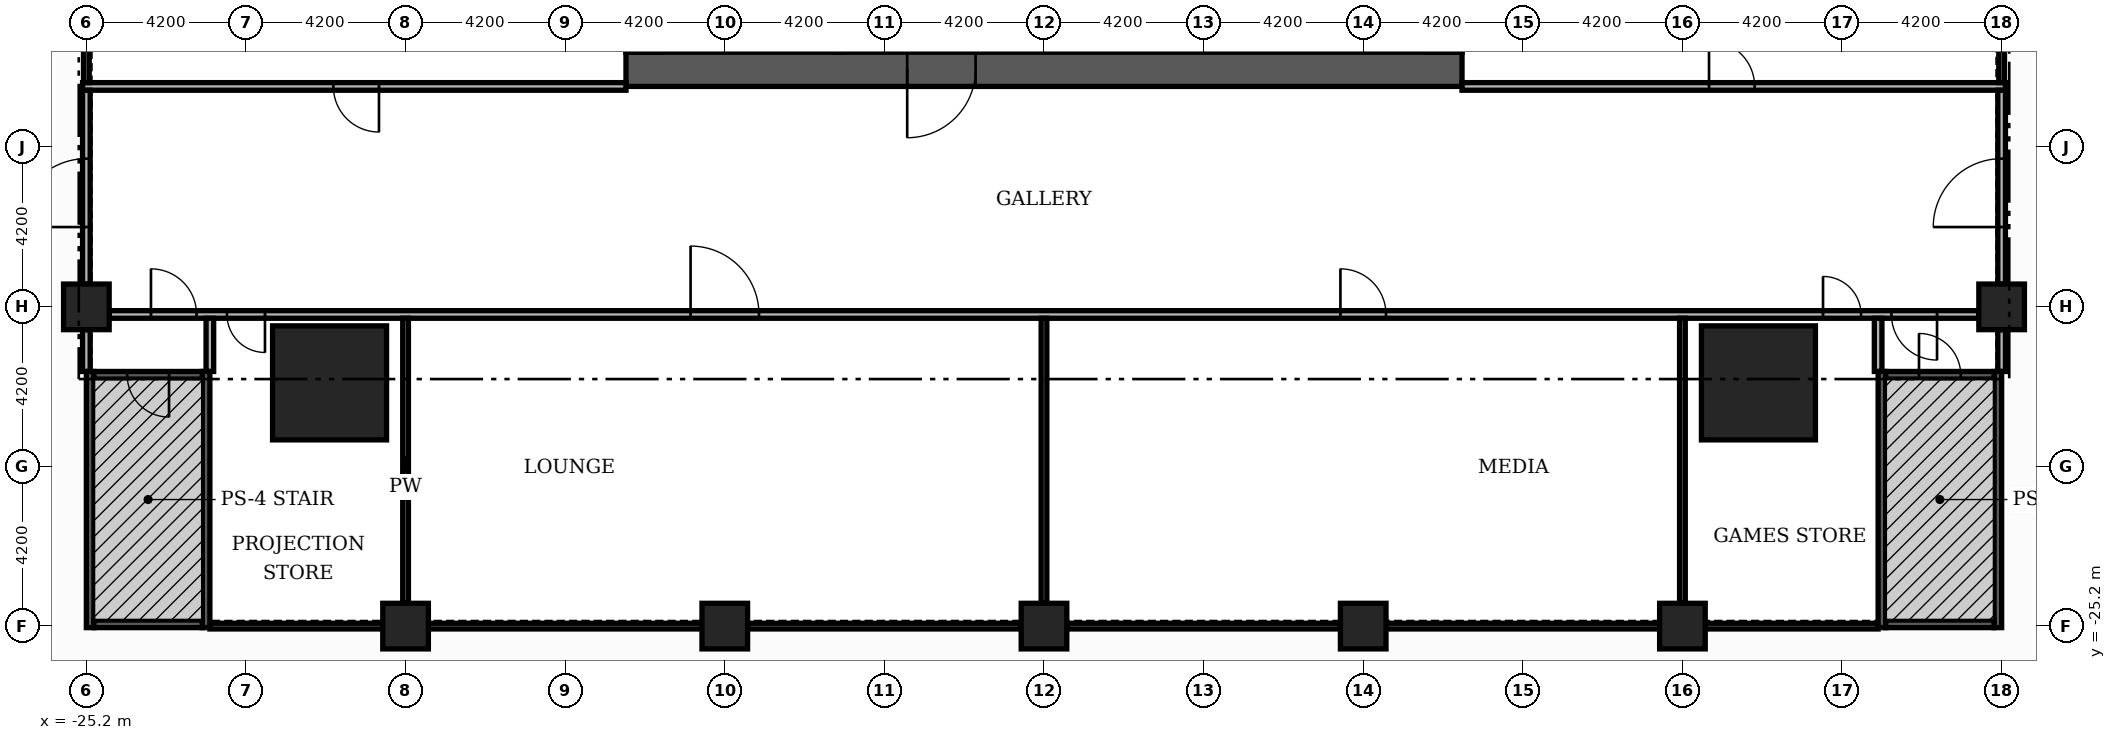
"""IFC4 building model, lengths in metres.
Left out: names, types, materials, properties, quantities, classifications, styles, units other than length and angle.
Written with IfcOpenShell. Run it as: python <this file> out.ifc"""

import sys

from ifc_helpers import new_model, si_unit, direction, frame, frame_2d, origin, origin_2d, place, context, subcontext, project, spatial, rectangle, extrude, element, fill, save


model = new_model("IFC4")
c1 = context("Model", 3, precision=1e-05, world=origin(), true_north=direction((0.0, 1.0)))
c2 = subcontext(c1, "Body", "Model", "MODEL_VIEW")
j1 = project(units=[si_unit("LENGTHUNIT", "METRE"), si_unit("PLANEANGLEUNIT", "RADIAN")], contexts=[c1])
p1 = place(None, origin())
s1 = spatial("IfcSite", under=j1, at=p1, CompositionType="ELEMENT")
p2 = place(p1, origin())
s2 = spatial("IfcBuilding", under=s1, at=p2, CompositionType="ELEMENT")
p3 = place(p2, frame((0.0, 0.0, 22.2)))
s3 = spatial("IfcBuildingStorey", under=s2, at=p3, CompositionType="ELEMENT", Elevation=22.2)
p4 = place(p3, frame((-11.0, -10.55, 0.0), z_axis=(0.0, 0.0, 1.0), x_axis=(1.0, 0.0, 0.0)))
e1 = element("IfcWall", 1, at=p4, inside=s3, PredefinedType="SHEAR", context=c2, shape_type="SweptSolid", body=[
    extrude(rectangle(XDim=22.0, YDim=0.9, at=frame_2d((11.0, 0.0))), origin(), (0.0, 0.0, 1.0), 4.3),
])
p5 = place(p4, frame((7.4, 0.0, 0.0)))
e2 = element("IfcOpeningElement", 2, at=p5, cuts=e1, PredefinedType="OPENING", context=c2, shape_type="SweptSolid", body=[
    extrude(rectangle(XDim=1.8, YDim=2.2, at=frame_2d((0.9, 1.1))), frame((0.0, 0.46, 0.0), z_axis=(0.0, -1.0, 0.0), x_axis=(1.0, 0.0, 0.0)), (0.0, 0.0, 1.0), 0.92),
])
for number, where, z_axis, x_axis in (
    (3, (18.8, -18.8, 0.0), (0.0, 0.0, 1.0), (1.0, 0.0, 0.0)),
    (4, (-18.8, -18.8, 0.0), (0.0, 0.0, 1.0), (1.0, 0.0, 0.0)),
):
    element("IfcColumn", number, at=place(p3, frame(where, z_axis=z_axis, x_axis=x_axis)), inside=s3, PredefinedType="COLUMN", context=c2, shape_type="SweptSolid", body=[
        extrude(rectangle(XDim=3.0, YDim=3.0, at=origin_2d()), origin(), (0.0, 0.0, 1.0), 4.8),
    ])
for number, where, z_axis, x_axis in (
    (5, (25.2, -16.8, 0.0), (0.0, 0.0, 1.0), (1.0, 0.0, 0.0)),
    (6, (0.0, -25.2, 0.0), (0.0, 0.0, 1.0), (1.0, 0.0, 0.0)),
    (7, (8.4, -25.2, 0.0), (0.0, 0.0, 1.0), (1.0, 0.0, 0.0)),
    (8, (16.8, -25.2, 0.0), (0.0, 0.0, 1.0), (1.0, 0.0, 0.0)),
    (9, (-8.4, -25.2, 0.0), (0.0, 0.0, 1.0), (1.0, 0.0, 0.0)),
    (10, (-16.8, -25.2, 0.0), (0.0, 0.0, 1.0), (1.0, 0.0, 0.0)),
    (11, (-25.2, -16.8, 0.0), (0.0, 0.0, 1.0), (1.0, 0.0, 0.0)),
):
    element("IfcColumn", number, at=place(p3, frame(where, z_axis=z_axis, x_axis=x_axis)), inside=s3, PredefinedType="COLUMN", context=c2, shape_type="SweptSolid", body=[
        extrude(rectangle(XDim=1.2, YDim=1.2, at=origin_2d()), origin(), (0.0, 0.0, 1.0), 4.8),
    ])
p6 = place(p3, frame((-21.95, -25.2, 0.0), z_axis=(0.0, 0.0, 1.0), x_axis=(1.0, 0.0, 0.0)))
e12 = element("IfcWall", 12, at=p6, inside=s3, PredefinedType="PARTITIONING", context=c2, shape_type="SweptSolid", body=[
    extrude(rectangle(XDim=4.55, YDim=0.15, at=frame_2d((2.275, 0.0))), origin(), (0.0, 0.0, 1.0), 4.3),
])
for number, where, z_axis, x_axis in (
    (13, (-16.2, -25.2, 0.0), (0.0, 0.0, 1.0), (1.0, 0.0, 0.0)),
    (14, (-7.8, -25.2, 0.0), (0.0, 0.0, 1.0), (1.0, 0.0, 0.0)),
    (15, (0.6, -25.2, 0.0), (0.0, 0.0, 1.0), (1.0, 0.0, 0.0)),
    (16, (9.0, -25.2, 0.0), (0.0, 0.0, 1.0), (1.0, 0.0, 0.0)),
):
    element("IfcWall", number, at=place(p3, frame(where, z_axis=z_axis, x_axis=x_axis)), inside=s3, PredefinedType="PARTITIONING", context=c2, shape_type="SweptSolid", body=[
        extrude(rectangle(XDim=7.2, YDim=0.15, at=frame_2d((3.6, 0.0))), origin(), (0.0, 0.0, 1.0), 4.3),
    ])
p7 = place(p3, frame((17.4, -25.2, 0.0), z_axis=(0.0, 0.0, 1.0), x_axis=(1.0, 0.0, 0.0)))
e17 = element("IfcWall", 17, at=p7, inside=s3, PredefinedType="PARTITIONING", context=c2, shape_type="SweptSolid", body=[
    extrude(rectangle(XDim=4.55, YDim=0.15, at=frame_2d((2.275, 0.0))), origin(), (0.0, 0.0, 1.0), 4.3),
])
p8 = place(p3, frame((-24.6, -17.0, 0.0), z_axis=(0.0, 0.0, 1.0), x_axis=(1.0, 0.0, 0.0)))
e18 = element("IfcWall", 18, at=p8, inside=s3, PredefinedType="PARTITIONING", context=c2, shape_type="SweptSolid", body=[
    extrude(rectangle(XDim=49.2, YDim=0.2, at=frame_2d((24.6, 0.0))), origin(), (0.0, 0.0, 1.0), 4.3),
])
p9 = place(p8, frame((1.1, 0.0, 0.0)))
e19 = element("IfcOpeningElement", 19, at=p9, cuts=e18, PredefinedType="OPENING", context=c2, shape_type="SweptSolid", body=[
    extrude(rectangle(XDim=1.2, YDim=2.2, at=frame_2d((0.6, 1.1))), frame((0.0, 0.11, 0.0), z_axis=(0.0, -1.0, 0.0), x_axis=(1.0, 0.0, 0.0)), (0.0, 0.0, 1.0), 0.22),
])
p10 = place(p8, frame((3.1, 0.0, 0.0)))
e20 = element("IfcOpeningElement", 20, at=p10, cuts=e18, PredefinedType="OPENING", context=c2, shape_type="SweptSolid", body=[
    extrude(rectangle(XDim=1.0, YDim=2.1, at=frame_2d((0.5, 1.05))), frame((0.0, 0.11, 0.0), z_axis=(0.0, -1.0, 0.0), x_axis=(1.0, 0.0, 0.0)), (0.0, 0.0, 1.0), 0.22),
])
p11 = place(p8, frame((15.3, 0.0, 0.0)))
e21 = element("IfcOpeningElement", 21, at=p11, cuts=e18, PredefinedType="OPENING", context=c2, shape_type="SweptSolid", body=[
    extrude(rectangle(XDim=1.8, YDim=2.2, at=frame_2d((0.9, 1.1))), frame((0.0, 0.11, 0.0), z_axis=(0.0, -1.0, 0.0), x_axis=(1.0, 0.0, 0.0)), (0.0, 0.0, 1.0), 0.22),
])
p12 = place(p8, frame((32.4, 0.0, 0.0)))
e22 = element("IfcOpeningElement", 22, at=p12, cuts=e18, PredefinedType="OPENING", context=c2, shape_type="SweptSolid", body=[
    extrude(rectangle(XDim=1.2, YDim=2.2, at=frame_2d((0.6, 1.1))), frame((0.0, 0.11, 0.0), z_axis=(0.0, -1.0, 0.0), x_axis=(1.0, 0.0, 0.0)), (0.0, 0.0, 1.0), 0.22),
])
p13 = place(p8, frame((45.1, 0.0, 0.0)))
e23 = element("IfcOpeningElement", 23, at=p13, cuts=e18, PredefinedType="OPENING", context=c2, shape_type="SweptSolid", body=[
    extrude(rectangle(XDim=1.0, YDim=2.1, at=frame_2d((0.5, 1.05))), frame((0.0, 0.11, 0.0), z_axis=(0.0, -1.0, 0.0), x_axis=(1.0, 0.0, 0.0)), (0.0, 0.0, 1.0), 0.22),
])
p14 = place(p8, frame((46.9, 0.0, 0.0)))
e24 = element("IfcOpeningElement", 24, at=p14, cuts=e18, PredefinedType="OPENING", context=c2, shape_type="SweptSolid", body=[
    extrude(rectangle(XDim=1.2, YDim=2.2, at=frame_2d((0.6, 1.1))), frame((0.0, 0.11, 0.0), z_axis=(0.0, -1.0, 0.0), x_axis=(1.0, 0.0, 0.0)), (0.0, 0.0, 1.0), 0.22),
])
p15 = place(p3, frame((-25.3, -11.0, 0.0), z_axis=(0.0, 0.0, 1.0), x_axis=(1.0, 0.0, 0.0)))
e25 = element("IfcWall", 25, at=p15, inside=s3, PredefinedType="PARTITIONING", context=c2, shape_type="SweptSolid", body=[
    extrude(rectangle(XDim=14.3, YDim=0.2, at=frame_2d((7.15, 0.0))), origin(), (0.0, 0.0, 1.0), 4.3),
])
p16 = place(p15, frame((6.6, 0.0, 0.0)))
e26 = element("IfcOpeningElement", 26, at=p16, cuts=e25, PredefinedType="OPENING", context=c2, shape_type="SweptSolid", body=[
    extrude(rectangle(XDim=1.2, YDim=2.2, at=frame_2d((0.6, 1.1))), frame((0.0, 0.11, 0.0), z_axis=(0.0, -1.0, 0.0), x_axis=(1.0, 0.0, 0.0)), (0.0, 0.0, 1.0), 0.22),
])
p17 = place(p3, frame((11.0, -11.0, 0.0), z_axis=(0.0, 0.0, 1.0), x_axis=(1.0, 0.0, 0.0)))
e27 = element("IfcWall", 27, at=p17, inside=s3, PredefinedType="PARTITIONING", context=c2, shape_type="SweptSolid", body=[
    extrude(rectangle(XDim=14.3, YDim=0.2, at=frame_2d((7.15, 0.0))), origin(), (0.0, 0.0, 1.0), 4.3),
])
p18 = place(p17, frame((6.5, 0.0, 0.0)))
e28 = element("IfcOpeningElement", 28, at=p18, cuts=e27, PredefinedType="OPENING", context=c2, shape_type="SweptSolid", body=[
    extrude(rectangle(XDim=1.2, YDim=2.2, at=frame_2d((0.6, 1.1))), frame((0.0, 0.11, 0.0), z_axis=(0.0, -1.0, 0.0), x_axis=(1.0, 0.0, 0.0)), (0.0, 0.0, 1.0), 0.22),
])
p19 = place(p3, frame((-25.2, -18.5, 0.0), z_axis=(0.0, 0.0, 1.0), x_axis=(0.0, 1.0, 0.0)))
e29 = element("IfcWall", 29, at=p19, inside=s3, PredefinedType="PARTITIONING", context=c2, shape_type="SweptSolid", body=[
    extrude(rectangle(XDim=1.1, YDim=0.2, at=frame_2d((0.55, 0.0))), origin(), (0.0, 0.0, 1.0), 4.3),
])
p20 = place(p3, frame((-25.2, -16.2, 0.0), z_axis=(0.0, 0.0, 1.0), x_axis=(0.0, 1.0, 0.0)))
e30 = element("IfcWall", 30, at=p20, inside=s3, PredefinedType="PARTITIONING", context=c2, shape_type="SweptSolid", body=[
    extrude(rectangle(XDim=5.1, YDim=0.2, at=frame_2d((2.55, 0.0))), origin(), (0.0, 0.0, 1.0), 4.3),
])
p21 = place(p20, frame((1.5, 0.0, 0.0)))
e31 = element("IfcOpeningElement", 31, at=p21, cuts=e30, PredefinedType="OPENING", context=c2, shape_type="SweptSolid", body=[
    extrude(rectangle(XDim=1.8, YDim=2.2, at=frame_2d((0.9, 1.1))), frame((0.0, 0.11, 0.0), z_axis=(0.0, -1.0, 0.0), x_axis=(1.0, 0.0, 0.0)), (0.0, 0.0, 1.0), 0.22),
])
p22 = place(p3, frame((-25.2, -10.9, 0.0), z_axis=(0.0, 0.0, 1.0), x_axis=(0.0, 1.0, 0.0)))
e32 = element("IfcWall", 32, at=p22, inside=s3, PredefinedType="PARTITIONING", context=c2, shape_type="SweptSolid", body=[
    extrude(rectangle(XDim=1.9, YDim=0.15, at=frame_2d((0.95, 0.0))), origin(), (0.0, 0.0, 1.0), 4.3),
])
p23 = place(p3, frame((-21.95, -18.5, 0.0), z_axis=(0.0, 0.0, 1.0), x_axis=(0.0, 1.0, 0.0)))
e33 = element("IfcWall", 33, at=p23, inside=s3, PredefinedType="PARTITIONING", context=c2, shape_type="SweptSolid", body=[
    extrude(rectangle(XDim=1.4, YDim=0.2, at=frame_2d((0.7, 0.0))), origin(), (0.0, 0.0, 1.0), 4.3),
])
for number, where, z_axis, x_axis in (
    (34, (-16.8, -24.6, 0.0), (0.0, 0.0, 1.0), (0.0, 1.0, 0.0)),
    (35, (0.0, -24.6, 0.0), (0.0, 0.0, 1.0), (0.0, 1.0, 0.0)),
    (36, (16.8, -24.6, 0.0), (0.0, 0.0, 1.0), (0.0, 1.0, 0.0)),
):
    element("IfcWall", number, at=place(p3, frame(where, z_axis=z_axis, x_axis=x_axis)), inside=s3, PredefinedType="PARTITIONING", context=c2, shape_type="SweptSolid", body=[
        extrude(rectangle(XDim=7.5, YDim=0.15, at=frame_2d((3.75, 0.0))), origin(), (0.0, 0.0, 1.0), 4.3),
    ])
p24 = place(p3, frame((21.95, -18.5, 0.0), z_axis=(0.0, 0.0, 1.0), x_axis=(0.0, 1.0, 0.0)))
e37 = element("IfcWall", 37, at=p24, inside=s3, PredefinedType="PARTITIONING", context=c2, shape_type="SweptSolid", body=[
    extrude(rectangle(XDim=1.4, YDim=0.2, at=frame_2d((0.7, 0.0))), origin(), (0.0, 0.0, 1.0), 4.3),
])
p25 = place(p3, frame((25.2, -18.5, 0.0), z_axis=(0.0, 0.0, 1.0), x_axis=(0.0, 1.0, 0.0)))
e38 = element("IfcWall", 38, at=p25, inside=s3, PredefinedType="PARTITIONING", context=c2, shape_type="SweptSolid", body=[
    extrude(rectangle(XDim=1.1, YDim=0.2, at=frame_2d((0.55, 0.0))), origin(), (0.0, 0.0, 1.0), 4.3),
])
p26 = place(p3, frame((25.2, -16.2, 0.0), z_axis=(0.0, 0.0, 1.0), x_axis=(0.0, 1.0, 0.0)))
e39 = element("IfcWall", 39, at=p26, inside=s3, PredefinedType="PARTITIONING", context=c2, shape_type="SweptSolid", body=[
    extrude(rectangle(XDim=5.1, YDim=0.2, at=frame_2d((2.55, 0.0))), origin(), (0.0, 0.0, 1.0), 4.3),
])
p27 = place(p26, frame((1.5, 0.0, 0.0)))
e40 = element("IfcOpeningElement", 40, at=p27, cuts=e39, PredefinedType="OPENING", context=c2, shape_type="SweptSolid", body=[
    extrude(rectangle(XDim=1.8, YDim=2.2, at=frame_2d((0.9, 1.1))), frame((0.0, 0.11, 0.0), z_axis=(0.0, -1.0, 0.0), x_axis=(1.0, 0.0, 0.0)), (0.0, 0.0, 1.0), 0.22),
])
p28 = place(p3, frame((25.2, -10.9, 0.0), z_axis=(0.0, 0.0, 1.0), x_axis=(0.0, 1.0, 0.0)))
e41 = element("IfcWall", 41, at=p28, inside=s3, PredefinedType="PARTITIONING", context=c2, shape_type="SweptSolid", body=[
    extrude(rectangle(XDim=1.9, YDim=0.15, at=frame_2d((0.95, 0.0))), origin(), (0.0, 0.0, 1.0), 4.3),
])
for number, where, z_axis, x_axis in (
    (42, (22.05, -25.24, 0.0), (0.0, 0.0, 1.0), (0.0, 1.0, 0.0)),
    (43, (25.1, -25.24, 0.0), (0.0, 0.0, 1.0), (0.0, 1.0, 0.0)),
):
    element("IfcWall", number, at=place(p3, frame(where, z_axis=z_axis, x_axis=x_axis)), inside=s3, PredefinedType="SOLIDWALL", context=c2, shape_type="SweptSolid", body=[
        extrude(rectangle(XDim=6.74, YDim=0.2, at=frame_2d((3.37, 0.0))), origin(), (0.0, 0.0, 1.0), 4.3),
    ])
p29 = place(p3, frame((22.15, -25.14, 0.0), z_axis=(0.0, 0.0, 1.0), x_axis=(1.0, 0.0, 0.0)))
e44 = element("IfcWall", 44, at=p29, inside=s3, PredefinedType="SOLIDWALL", context=c2, shape_type="SweptSolid", body=[
    extrude(rectangle(XDim=2.85, YDim=0.2, at=frame_2d((1.425, 0.0))), origin(), (0.0, 0.0, 1.0), 4.3),
])
p30 = place(p3, frame((22.15, -18.6, 0.0), z_axis=(0.0, 0.0, 1.0), x_axis=(1.0, 0.0, 0.0)))
e45 = element("IfcWall", 45, at=p30, inside=s3, PredefinedType="SOLIDWALL", context=c2, shape_type="SweptSolid", body=[
    extrude(rectangle(XDim=2.85, YDim=0.2, at=frame_2d((1.425, 0.0))), origin(), (0.0, 0.0, 1.0), 4.3),
])
p31 = place(p30, frame((0.875, 0.0, 0.0)))
e46 = element("IfcOpeningElement", 46, at=p31, cuts=e45, PredefinedType="OPENING", context=c2, shape_type="SweptSolid", body=[
    extrude(rectangle(XDim=1.1, YDim=2.2, at=frame_2d((0.55, 1.1))), frame((0.0, 0.11, 0.0), z_axis=(0.0, -1.0, 0.0), x_axis=(1.0, 0.0, 0.0)), (0.0, 0.0, 1.0), 0.22),
])
for number, where, z_axis, x_axis in (
    (47, (-25.1, -25.24, 0.0), (0.0, 0.0, 1.0), (0.0, 1.0, 0.0)),
    (48, (-22.05, -25.24, 0.0), (0.0, 0.0, 1.0), (0.0, 1.0, 0.0)),
):
    element("IfcWall", number, at=place(p3, frame(where, z_axis=z_axis, x_axis=x_axis)), inside=s3, PredefinedType="SOLIDWALL", context=c2, shape_type="SweptSolid", body=[
        extrude(rectangle(XDim=6.74, YDim=0.2, at=frame_2d((3.37, 0.0))), origin(), (0.0, 0.0, 1.0), 4.3),
    ])
p32 = place(p3, frame((-25.0, -25.14, 0.0), z_axis=(0.0, 0.0, 1.0), x_axis=(1.0, 0.0, 0.0)))
e49 = element("IfcWall", 49, at=p32, inside=s3, PredefinedType="SOLIDWALL", context=c2, shape_type="SweptSolid", body=[
    extrude(rectangle(XDim=2.85, YDim=0.2, at=frame_2d((1.425, 0.0))), origin(), (0.0, 0.0, 1.0), 4.3),
])
p33 = place(p3, frame((-25.0, -18.6, 0.0), z_axis=(0.0, 0.0, 1.0), x_axis=(1.0, 0.0, 0.0)))
e50 = element("IfcWall", 50, at=p33, inside=s3, PredefinedType="SOLIDWALL", context=c2, shape_type="SweptSolid", body=[
    extrude(rectangle(XDim=2.85, YDim=0.2, at=frame_2d((1.425, 0.0))), origin(), (0.0, 0.0, 1.0), 4.3),
])
p34 = place(p33, frame((0.875, 0.0, 0.0)))
e51 = element("IfcOpeningElement", 51, at=p34, cuts=e50, PredefinedType="OPENING", context=c2, shape_type="SweptSolid", body=[
    extrude(rectangle(XDim=1.1, YDim=2.2, at=frame_2d((0.55, 1.1))), frame((0.0, 0.11, 0.0), z_axis=(0.0, -1.0, 0.0), x_axis=(1.0, 0.0, 0.0)), (0.0, 0.0, 1.0), 0.22),
])
p35 = place(p5, frame((1.8, 0.0, 0.0), z_axis=(0.0, 0.0, 1.0), x_axis=(-1.0, 0.0, 0.0)))
e52 = element("IfcDoor", 52, at=p35, inside=s3, OperationType="DOUBLE_DOOR_SINGLE_SWING", PredefinedType="DOOR", context=c2, shape_type="SweptSolid", body=[
    extrude(rectangle(XDim=1.8, YDim=2.2, at=frame_2d((0.9, 1.1))), frame((0.0, 0.025, 0.0), z_axis=(0.0, -1.0, 0.0), x_axis=(1.0, 0.0, 0.0)), (0.0, 0.0, 1.0), 0.05),
])
fill(e2, e52)
p36 = place(p9, origin())
e53 = element("IfcDoor", 53, at=p36, inside=s3, OperationType="SINGLE_SWING_LEFT", PredefinedType="DOOR", context=c2, shape_type="SweptSolid", body=[
    extrude(rectangle(XDim=1.2, YDim=2.2, at=frame_2d((0.6, 1.1))), frame((0.0, 0.025, 0.0), z_axis=(0.0, -1.0, 0.0), x_axis=(1.0, 0.0, 0.0)), (0.0, 0.0, 1.0), 0.05),
])
fill(e19, e53)
p37 = place(p10, origin())
e54 = element("IfcDoor", 54, at=p37, inside=s3, OperationType="SINGLE_SWING_RIGHT", PredefinedType="DOOR", context=c2, shape_type="SweptSolid", body=[
    extrude(rectangle(XDim=1.0, YDim=2.1, at=frame_2d((0.5, 1.05))), frame((0.0, 0.025, 0.0), z_axis=(0.0, -1.0, 0.0), x_axis=(1.0, 0.0, 0.0)), (0.0, 0.0, 1.0), 0.05),
])
fill(e20, e54)
p38 = place(p11, origin())
e55 = element("IfcDoor", 55, at=p38, inside=s3, OperationType="DOUBLE_DOOR_SINGLE_SWING", PredefinedType="DOOR", context=c2, shape_type="SweptSolid", body=[
    extrude(rectangle(XDim=1.8, YDim=2.2, at=frame_2d((0.9, 1.1))), frame((0.0, 0.025, 0.0), z_axis=(0.0, -1.0, 0.0), x_axis=(1.0, 0.0, 0.0)), (0.0, 0.0, 1.0), 0.05),
])
fill(e21, e55)
p39 = place(p12, origin())
e56 = element("IfcDoor", 56, at=p39, inside=s3, OperationType="SINGLE_SWING_LEFT", PredefinedType="DOOR", context=c2, shape_type="SweptSolid", body=[
    extrude(rectangle(XDim=1.2, YDim=2.2, at=frame_2d((0.6, 1.1))), frame((0.0, 0.025, 0.0), z_axis=(0.0, -1.0, 0.0), x_axis=(1.0, 0.0, 0.0)), (0.0, 0.0, 1.0), 0.05),
])
fill(e22, e56)
p40 = place(p13, origin())
e57 = element("IfcDoor", 57, at=p40, inside=s3, OperationType="SINGLE_SWING_LEFT", PredefinedType="DOOR", context=c2, shape_type="SweptSolid", body=[
    extrude(rectangle(XDim=1.0, YDim=2.1, at=frame_2d((0.5, 1.05))), frame((0.0, 0.025, 0.0), z_axis=(0.0, -1.0, 0.0), x_axis=(1.0, 0.0, 0.0)), (0.0, 0.0, 1.0), 0.05),
])
fill(e23, e57)
p41 = place(p14, origin())
e58 = element("IfcDoor", 58, at=p41, inside=s3, OperationType="SINGLE_SWING_RIGHT", PredefinedType="DOOR", context=c2, shape_type="SweptSolid", body=[
    extrude(rectangle(XDim=1.2, YDim=2.2, at=frame_2d((0.6, 1.1))), frame((0.0, 0.025, 0.0), z_axis=(0.0, -1.0, 0.0), x_axis=(1.0, 0.0, 0.0)), (0.0, 0.0, 1.0), 0.05),
])
fill(e24, e58)
p42 = place(p21, origin())
e59 = element("IfcDoor", 59, at=p42, inside=s3, OperationType="DOUBLE_DOOR_SINGLE_SWING", PredefinedType="DOOR", context=c2, shape_type="SweptSolid", body=[
    extrude(rectangle(XDim=1.8, YDim=2.2, at=frame_2d((0.9, 1.1))), frame((0.0, 0.025, 0.0), z_axis=(0.0, -1.0, 0.0), x_axis=(1.0, 0.0, 0.0)), (0.0, 0.0, 1.0), 0.05),
])
fill(e31, e59)
p43 = place(p27, origin())
e60 = element("IfcDoor", 60, at=p43, inside=s3, OperationType="DOUBLE_DOOR_SINGLE_SWING", PredefinedType="DOOR", context=c2, shape_type="SweptSolid", body=[
    extrude(rectangle(XDim=1.8, YDim=2.2, at=frame_2d((0.9, 1.1))), frame((0.0, 0.025, 0.0), z_axis=(0.0, -1.0, 0.0), x_axis=(1.0, 0.0, 0.0)), (0.0, 0.0, 1.0), 0.05),
])
fill(e40, e60)
p44 = place(p16, origin())
e61 = element("IfcDoor", 61, at=p44, inside=s3, OperationType="SINGLE_SWING_RIGHT", PredefinedType="DOOR", context=c2, shape_type="SweptSolid", body=[
    extrude(rectangle(XDim=1.2, YDim=2.2, at=frame_2d((0.6, 1.1))), frame((0.0, 0.025, 0.0), z_axis=(0.0, -1.0, 0.0), x_axis=(1.0, 0.0, 0.0)), (0.0, 0.0, 1.0), 0.05),
])
fill(e26, e61)
p45 = place(p18, origin())
e62 = element("IfcDoor", 62, at=p45, inside=s3, OperationType="SINGLE_SWING_LEFT", PredefinedType="DOOR", context=c2, shape_type="SweptSolid", body=[
    extrude(rectangle(XDim=1.2, YDim=2.2, at=frame_2d((0.6, 1.1))), frame((0.0, 0.025, 0.0), z_axis=(0.0, -1.0, 0.0), x_axis=(1.0, 0.0, 0.0)), (0.0, 0.0, 1.0), 0.05),
])
fill(e28, e62)
p46 = place(p31, origin())
e63 = element("IfcDoor", 63, at=p46, inside=s3, OperationType="SINGLE_SWING_LEFT", PredefinedType="DOOR", context=c2, shape_type="SweptSolid", body=[
    extrude(rectangle(XDim=1.1, YDim=2.2, at=frame_2d((0.55, 1.1))), frame((0.0, 0.025, 0.0), z_axis=(0.0, -1.0, 0.0), x_axis=(1.0, 0.0, 0.0)), (0.0, 0.0, 1.0), 0.05),
])
fill(e46, e63)
p47 = place(p34, origin())
e64 = element("IfcDoor", 64, at=p47, inside=s3, OperationType="SINGLE_SWING_RIGHT", PredefinedType="DOOR", context=c2, shape_type="SweptSolid", body=[
    extrude(rectangle(XDim=1.1, YDim=2.2, at=frame_2d((0.55, 1.1))), frame((0.0, 0.025, 0.0), z_axis=(0.0, -1.0, 0.0), x_axis=(1.0, 0.0, 0.0)), (0.0, 0.0, 1.0), 0.05),
])
fill(e51, e64)
save(model, sys.argv[1])
